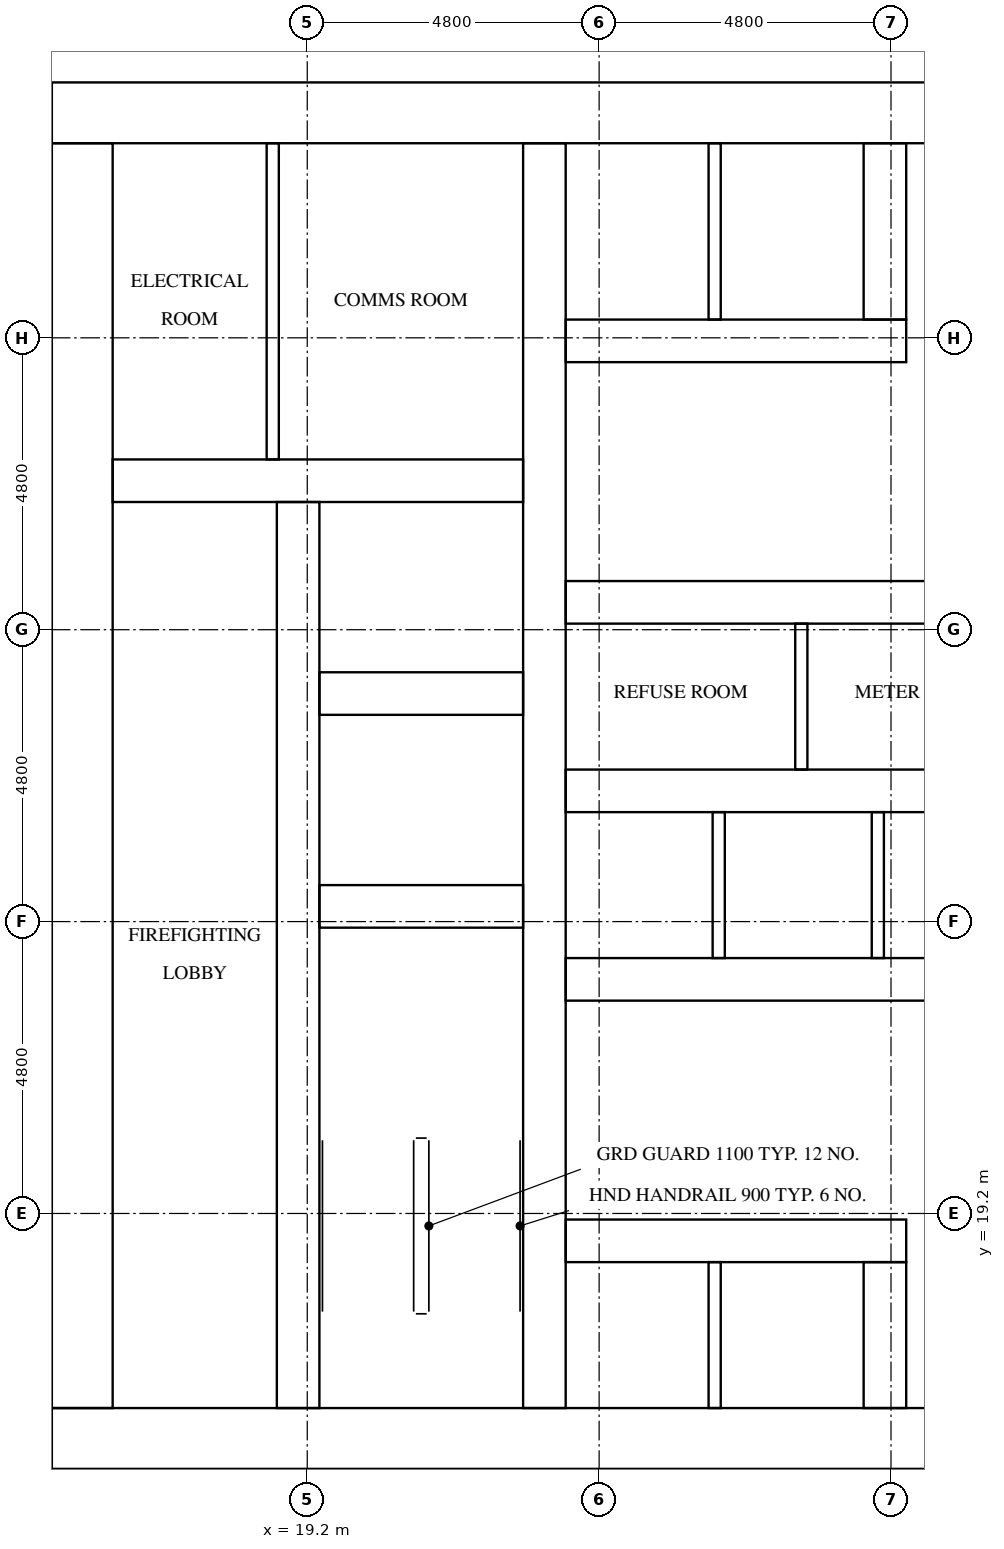
"""IFC4 building model, lengths in metres.
Left out: names, types, materials, properties, quantities, classifications, styles, units other than length and angle.
Written with IfcOpenShell. Run it as: python <this file> out.ifc"""

import sys

from ifc_helpers import new_model, si_unit, direction, frame, frame_2d, origin, place, context, subcontext, project, spatial, rectangle, extrude, element, fill, save


model = new_model("IFC4")
c1 = context("Model", 3, precision=1e-05, world=origin(), true_north=direction((0.0, 1.0)))
c2 = subcontext(c1, "Body", "Model", "MODEL_VIEW")
j1 = project(units=[si_unit("LENGTHUNIT", "METRE"), si_unit("PLANEANGLEUNIT", "RADIAN")], contexts=[c1])
p1 = place(None, origin())
s1 = spatial("IfcSite", under=j1, at=p1, CompositionType="ELEMENT")
p2 = place(p1, origin())
s2 = spatial("IfcBuilding", under=s1, at=p2, CompositionType="ELEMENT")
p3 = place(p2, frame((0.0, 0.0, 46.9)))
s3 = spatial("IfcBuildingStorey", under=s2, at=p3, CompositionType="ELEMENT", Elevation=46.9)
p4 = place(p3, frame((15.0, 15.5, 0.0), z_axis=(0.0, 0.0, 1.0), x_axis=(1.0, 0.0, 0.0)))
e1 = element("IfcWall", 1, at=p4, inside=s3, PredefinedType="SHEAR", context=c2, shape_type="SweptSolid", body=[
    extrude(rectangle(XDim=32.4, YDim=1.0, at=frame_2d((16.2, 0.0))), origin(), (0.0, 0.0, 1.0), 3.2),
])
p5 = place(p4, frame((15.3, 0.0, 0.0)))
e2 = element("IfcOpeningElement", 2, at=p5, cuts=e1, PredefinedType="OPENING", context=c2, shape_type="SweptSolid", body=[
    extrude(rectangle(XDim=1.8, YDim=2.1, at=frame_2d((0.9, 1.05))), frame((0.0, 0.51, 0.0), z_axis=(0.0, -1.0, 0.0), x_axis=(1.0, 0.0, 0.0)), (0.0, 0.0, 1.0), 1.02),
])
p6 = place(p3, frame((15.0, 37.3, 0.0), z_axis=(0.0, 0.0, 1.0), x_axis=(1.0, 0.0, 0.0)))
e3 = element("IfcWall", 3, at=p6, inside=s3, PredefinedType="SHEAR", context=c2, shape_type="SweptSolid", body=[
    extrude(rectangle(XDim=32.4, YDim=1.0, at=frame_2d((16.2, 0.0))), origin(), (0.0, 0.0, 1.0), 3.2),
])
p7 = place(p6, frame((15.3, 0.0, 0.0)))
e4 = element("IfcOpeningElement", 4, at=p7, cuts=e3, PredefinedType="OPENING", context=c2, shape_type="SweptSolid", body=[
    extrude(rectangle(XDim=1.8, YDim=2.1, at=frame_2d((0.9, 1.05))), frame((0.0, 0.51, 0.0), z_axis=(0.0, -1.0, 0.0), x_axis=(1.0, 0.0, 0.0)), (0.0, 0.0, 1.0), 1.02),
])
p8 = place(p6, frame((1.766, 0.0, 0.0)))
e5 = element("IfcOpeningElement", 5, at=p8, cuts=e3, PredefinedType="OPENING", context=c2, shape_type="SweptSolid", body=[
    extrude(rectangle(XDim=1.0, YDim=2.1, at=frame_2d((0.5, 1.05))), frame((0.0, 0.51, 0.0), z_axis=(0.0, -1.0, 0.0), x_axis=(1.0, 0.0, 0.0)), (0.0, 0.0, 1.0), 1.02),
])
p9 = place(p6, frame((5.241, 0.0, 0.0)))
e6 = element("IfcOpeningElement", 6, at=p9, cuts=e3, PredefinedType="OPENING", context=c2, shape_type="SweptSolid", body=[
    extrude(rectangle(XDim=1.0, YDim=2.1, at=frame_2d((0.5, 1.05))), frame((0.0, 0.51, 0.0), z_axis=(0.0, -1.0, 0.0), x_axis=(1.0, 0.0, 0.0)), (0.0, 0.0, 1.0), 1.02),
])
p10 = place(p3, frame((15.5, 16.0, 0.0), z_axis=(0.0, 0.0, 1.0), x_axis=(0.0, 1.0, 0.0)))
e7 = element("IfcWall", 7, at=p10, inside=s3, PredefinedType="SHEAR", context=c2, shape_type="SweptSolid", body=[
    extrude(rectangle(XDim=20.8, YDim=1.0, at=frame_2d((10.4, 0.0))), origin(), (0.0, 0.0, 1.0), 3.2),
])
p11 = place(p10, frame((4.76, 0.0, 0.0)))
e8 = element("IfcOpeningElement", 8, at=p11, cuts=e7, PredefinedType="OPENING", context=c2, shape_type="SweptSolid", body=[
    extrude(rectangle(XDim=1.2, YDim=2.1, at=frame_2d((0.6, 1.05))), frame((0.0, 0.51, 0.0), z_axis=(0.0, -1.0, 0.0), x_axis=(1.0, 0.0, 0.0)), (0.0, 0.0, 1.0), 1.02),
])
p12 = place(p3, frame((19.05, 16.0, 0.0), z_axis=(0.0, 0.0, 1.0), x_axis=(0.0, 1.0, 0.0)))
e9 = element("IfcWall", 9, at=p12, inside=s3, PredefinedType="SHEAR", context=c2, shape_type="SweptSolid", body=[
    extrude(rectangle(XDim=14.9, YDim=0.7, at=frame_2d((7.45, 0.0))), origin(), (0.0, 0.0, 1.0), 3.2),
])
p13 = place(p12, frame((9.45, 0.0, 0.0)))
e10 = element("IfcOpeningElement", 10, at=p13, cuts=e9, PredefinedType="OPENING", context=c2, shape_type="SweptSolid", body=[
    extrude(rectangle(XDim=1.1, YDim=2.1, at=frame_2d((0.55, 1.05))), frame((0.0, 0.36, 0.0), z_axis=(0.0, -1.0, 0.0), x_axis=(1.0, 0.0, 0.0)), (0.0, 0.0, 1.0), 0.72),
])
p14 = place(p12, frame((12.95, 0.0, 0.0)))
e11 = element("IfcOpeningElement", 11, at=p14, cuts=e9, PredefinedType="OPENING", context=c2, shape_type="SweptSolid", body=[
    extrude(rectangle(XDim=1.1, YDim=2.1, at=frame_2d((0.55, 1.05))), frame((0.0, 0.36, 0.0), z_axis=(0.0, -1.0, 0.0), x_axis=(1.0, 0.0, 0.0)), (0.0, 0.0, 1.0), 0.72),
])
p15 = place(p12, frame((0.2, 0.0, 0.0)))
e12 = element("IfcOpeningElement", 12, at=p15, cuts=e9, PredefinedType="OPENING", context=c2, shape_type="SweptSolid", body=[
    extrude(rectangle(XDim=1.2, YDim=2.1, at=frame_2d((0.6, 1.05))), frame((0.0, 0.36, 0.0), z_axis=(0.0, -1.0, 0.0), x_axis=(1.0, 0.0, 0.0)), (0.0, 0.0, 1.0), 0.72),
])
p16 = place(p3, frame((23.1, 16.0, 0.0), z_axis=(0.0, 0.0, 1.0), x_axis=(0.0, 1.0, 0.0)))
e13 = element("IfcWall", 13, at=p16, inside=s3, PredefinedType="SHEAR", context=c2, shape_type="SweptSolid", body=[
    extrude(rectangle(XDim=20.8, YDim=0.7, at=frame_2d((10.4, 0.0))), origin(), (0.0, 0.0, 1.0), 3.2),
])
for number, where, z_axis, x_axis in (
    (14, (19.4, 24.25, 0.0), (0.0, 0.0, 1.0), (1.0, 0.0, 0.0)),
    (15, (19.4, 27.75, 0.0), (0.0, 0.0, 1.0), (1.0, 0.0, 0.0)),
):
    element("IfcWall", number, at=place(p3, frame(where, z_axis=z_axis, x_axis=x_axis)), inside=s3, PredefinedType="SHEAR", context=c2, shape_type="SweptSolid", body=[
        extrude(rectangle(XDim=3.35, YDim=0.7, at=frame_2d((1.675, 0.0))), origin(), (0.0, 0.0, 1.0), 3.2),
    ])
p17 = place(p3, frame((16.0, 31.25, 0.0), z_axis=(0.0, 0.0, 1.0), x_axis=(1.0, 0.0, 0.0)))
e16 = element("IfcWall", 16, at=p17, inside=s3, PredefinedType="SHEAR", context=c2, shape_type="SweptSolid", body=[
    extrude(rectangle(XDim=6.75, YDim=0.7, at=frame_2d((3.375, 0.0))), origin(), (0.0, 0.0, 1.0), 3.2),
])
p18 = place(p3, frame((23.45, 18.75, 0.0), z_axis=(0.0, 0.0, 1.0), x_axis=(1.0, 0.0, 0.0)))
e17 = element("IfcWall", 17, at=p18, inside=s3, PredefinedType="SHEAR", context=c2, shape_type="SweptSolid", body=[
    extrude(rectangle(XDim=5.6, YDim=0.7, at=frame_2d((2.8, 0.0))), origin(), (0.0, 0.0, 1.0), 3.2),
])
p19 = place(p18, frame((0.625, 0.0, 0.0)))
e18 = element("IfcOpeningElement", 18, at=p19, cuts=e17, PredefinedType="OPENING", context=c2, shape_type="SweptSolid", body=[
    extrude(rectangle(XDim=1.1, YDim=2.1, at=frame_2d((0.55, 1.05))), frame((0.0, 0.36, 0.0), z_axis=(0.0, -1.0, 0.0), x_axis=(1.0, 0.0, 0.0)), (0.0, 0.0, 1.0), 0.72),
])
p20 = place(p18, frame((3.175, 0.0, 0.0)))
e19 = element("IfcOpeningElement", 19, at=p20, cuts=e17, PredefinedType="OPENING", context=c2, shape_type="SweptSolid", body=[
    extrude(rectangle(XDim=1.1, YDim=2.1, at=frame_2d((0.55, 1.05))), frame((0.0, 0.36, 0.0), z_axis=(0.0, -1.0, 0.0), x_axis=(1.0, 0.0, 0.0)), (0.0, 0.0, 1.0), 0.72),
])
p21 = place(p3, frame((23.45, 23.05, 0.0), z_axis=(0.0, 0.0, 1.0), x_axis=(1.0, 0.0, 0.0)))
e20 = element("IfcWall", 20, at=p21, inside=s3, PredefinedType="SHEAR", context=c2, shape_type="SweptSolid", body=[
    extrude(rectangle(XDim=15.5, YDim=0.7, at=frame_2d((7.75, 0.0))), origin(), (0.0, 0.0, 1.0), 3.2),
])
p22 = place(p21, frame((0.658, 0.0, 0.0)))
e21 = element("IfcOpeningElement", 21, at=p22, cuts=e20, PredefinedType="OPENING", context=c2, shape_type="SweptSolid", body=[
    extrude(rectangle(XDim=1.1, YDim=2.1, at=frame_2d((0.55, 1.05))), frame((0.0, 0.36, 0.0), z_axis=(0.0, -1.0, 0.0), x_axis=(1.0, 0.0, 0.0)), (0.0, 0.0, 1.0), 0.72),
])
p23 = place(p21, frame((3.275, 0.0, 0.0)))
e22 = element("IfcOpeningElement", 22, at=p23, cuts=e20, PredefinedType="OPENING", context=c2, shape_type="SweptSolid", body=[
    extrude(rectangle(XDim=1.1, YDim=2.1, at=frame_2d((0.55, 1.05))), frame((0.0, 0.36, 0.0), z_axis=(0.0, -1.0, 0.0), x_axis=(1.0, 0.0, 0.0)), (0.0, 0.0, 1.0), 0.72),
])
p24 = place(p21, frame((11.628, 0.0, 0.0)))
e23 = element("IfcOpeningElement", 23, at=p24, cuts=e20, PredefinedType="OPENING", context=c2, shape_type="SweptSolid", body=[
    extrude(rectangle(XDim=1.0, YDim=2.1, at=frame_2d((0.5, 1.05))), frame((0.0, 0.36, 0.0), z_axis=(0.0, -1.0, 0.0), x_axis=(1.0, 0.0, 0.0)), (0.0, 0.0, 1.0), 0.72),
])
p25 = place(p21, frame((14.245, 0.0, 0.0)))
e24 = element("IfcOpeningElement", 24, at=p25, cuts=e20, PredefinedType="OPENING", context=c2, shape_type="SweptSolid", body=[
    extrude(rectangle(XDim=1.0, YDim=2.1, at=frame_2d((0.5, 1.05))), frame((0.0, 0.36, 0.0), z_axis=(0.0, -1.0, 0.0), x_axis=(1.0, 0.0, 0.0)), (0.0, 0.0, 1.0), 0.72),
])
p26 = place(p3, frame((23.45, 26.15, 0.0), z_axis=(0.0, 0.0, 1.0), x_axis=(1.0, 0.0, 0.0)))
e25 = element("IfcWall", 25, at=p26, inside=s3, PredefinedType="SHEAR", context=c2, shape_type="SweptSolid", body=[
    extrude(rectangle(XDim=15.5, YDim=0.7, at=frame_2d((7.75, 0.0))), origin(), (0.0, 0.0, 1.0), 3.2),
])
p27 = place(p3, frame((23.45, 29.25, 0.0), z_axis=(0.0, 0.0, 1.0), x_axis=(1.0, 0.0, 0.0)))
e26 = element("IfcWall", 26, at=p27, inside=s3, PredefinedType="SHEAR", context=c2, shape_type="SweptSolid", body=[
    extrude(rectangle(XDim=15.5, YDim=0.7, at=frame_2d((7.75, 0.0))), origin(), (0.0, 0.0, 1.0), 3.2),
])
p28 = place(p27, frame((1.387, 0.0, 0.0)))
e27 = element("IfcOpeningElement", 27, at=p28, cuts=e26, PredefinedType="OPENING", context=c2, shape_type="SweptSolid", body=[
    extrude(rectangle(XDim=1.0, YDim=2.1, at=frame_2d((0.5, 1.05))), frame((0.0, 0.36, 0.0), z_axis=(0.0, -1.0, 0.0), x_axis=(1.0, 0.0, 0.0)), (0.0, 0.0, 1.0), 0.72),
])
p29 = place(p27, frame((5.312, 0.0, 0.0)))
e28 = element("IfcOpeningElement", 28, at=p29, cuts=e26, PredefinedType="OPENING", context=c2, shape_type="SweptSolid", body=[
    extrude(rectangle(XDim=1.0, YDim=2.1, at=frame_2d((0.5, 1.05))), frame((0.0, 0.36, 0.0), z_axis=(0.0, -1.0, 0.0), x_axis=(1.0, 0.0, 0.0)), (0.0, 0.0, 1.0), 0.72),
])
p30 = place(p27, frame((9.188, 0.0, 0.0)))
e29 = element("IfcOpeningElement", 29, at=p30, cuts=e26, PredefinedType="OPENING", context=c2, shape_type="SweptSolid", body=[
    extrude(rectangle(XDim=1.0, YDim=2.1, at=frame_2d((0.5, 1.05))), frame((0.0, 0.36, 0.0), z_axis=(0.0, -1.0, 0.0), x_axis=(1.0, 0.0, 0.0)), (0.0, 0.0, 1.0), 0.72),
])
p31 = place(p27, frame((13.113, 0.0, 0.0)))
e30 = element("IfcOpeningElement", 30, at=p31, cuts=e26, PredefinedType="OPENING", context=c2, shape_type="SweptSolid", body=[
    extrude(rectangle(XDim=1.0, YDim=2.1, at=frame_2d((0.5, 1.05))), frame((0.0, 0.36, 0.0), z_axis=(0.0, -1.0, 0.0), x_axis=(1.0, 0.0, 0.0)), (0.0, 0.0, 1.0), 0.72),
])
p32 = place(p3, frame((23.45, 33.55, 0.0), z_axis=(0.0, 0.0, 1.0), x_axis=(1.0, 0.0, 0.0)))
e31 = element("IfcWall", 31, at=p32, inside=s3, PredefinedType="SHEAR", context=c2, shape_type="SweptSolid", body=[
    extrude(rectangle(XDim=5.6, YDim=0.7, at=frame_2d((2.8, 0.0))), origin(), (0.0, 0.0, 1.0), 3.2),
])
p33 = place(p3, frame((28.7, 16.0, 0.0), z_axis=(0.0, 0.0, 1.0), x_axis=(0.0, 1.0, 0.0)))
e32 = element("IfcWall", 32, at=p33, inside=s3, PredefinedType="SHEAR", context=c2, shape_type="SweptSolid", body=[
    extrude(rectangle(XDim=2.4, YDim=0.7, at=frame_2d((1.2, 0.0))), origin(), (0.0, 0.0, 1.0), 3.2),
])
p34 = place(p3, frame((28.7, 33.9, 0.0), z_axis=(0.0, 0.0, 1.0), x_axis=(0.0, 1.0, 0.0)))
e33 = element("IfcWall", 33, at=p34, inside=s3, PredefinedType="SHEAR", context=c2, shape_type="SweptSolid", body=[
    extrude(rectangle(XDim=2.9, YDim=0.7, at=frame_2d((1.45, 0.0))), origin(), (0.0, 0.0, 1.0), 3.2),
])
for number, where, z_axis, x_axis in (
    (34, (25.967, 23.4, 0.0), (0.0, 0.0, 1.0), (0.0, 1.0, 0.0)),
    (35, (28.583, 23.4, 0.0), (0.0, 0.0, 1.0), (0.0, 1.0, 0.0)),
):
    element("IfcWall", number, at=place(p3, frame(where, z_axis=z_axis, x_axis=x_axis)), inside=s3, PredefinedType="SOLIDWALL", context=c2, shape_type="SweptSolid", body=[
        extrude(rectangle(XDim=2.4, YDim=0.2, at=frame_2d((1.2, 0.0))), origin(), (0.0, 0.0, 1.0), 3.2),
    ])
p35 = place(p3, frame((25.9, 16.0, 0.0), z_axis=(0.0, 0.0, 1.0), x_axis=(0.0, 1.0, 0.0)))
e36 = element("IfcWall", 36, at=p35, inside=s3, PredefinedType="SOLIDWALL", context=c2, shape_type="SweptSolid", body=[
    extrude(rectangle(XDim=2.4, YDim=0.2, at=frame_2d((1.2, 0.0))), origin(), (0.0, 0.0, 1.0), 3.2),
])
p36 = place(p3, frame((25.9, 33.9, 0.0), z_axis=(0.0, 0.0, 1.0), x_axis=(0.0, 1.0, 0.0)))
e37 = element("IfcWall", 37, at=p36, inside=s3, PredefinedType="SOLIDWALL", context=c2, shape_type="SweptSolid", body=[
    extrude(rectangle(XDim=2.9, YDim=0.2, at=frame_2d((1.45, 0.0))), origin(), (0.0, 0.0, 1.0), 3.2),
])
p37 = place(p3, frame((18.633, 31.6, 0.0), z_axis=(0.0, 0.0, 1.0), x_axis=(0.0, 1.0, 0.0)))
e38 = element("IfcWall", 38, at=p37, inside=s3, PredefinedType="PARTITIONING", context=c2, shape_type="SweptSolid", body=[
    extrude(rectangle(XDim=5.2, YDim=0.2, at=frame_2d((2.6, 0.0))), origin(), (0.0, 0.0, 1.0), 3.2),
])
p38 = place(p3, frame((27.325, 26.5, 0.0), z_axis=(0.0, 0.0, 1.0), x_axis=(0.0, 1.0, 0.0)))
e39 = element("IfcWall", 39, at=p38, inside=s3, PredefinedType="PARTITIONING", context=c2, shape_type="SweptSolid", body=[
    extrude(rectangle(XDim=2.4, YDim=0.2, at=frame_2d((1.2, 0.0))), origin(), (0.0, 0.0, 1.0), 3.2),
])
p39 = place(p19, origin())
e40 = element("IfcDoor", 40, at=p39, inside=s3, OperationType="DOUBLE_DOOR_SLIDING", PredefinedType="DOOR", context=c2, shape_type="SweptSolid", body=[
    extrude(rectangle(XDim=1.1, YDim=2.1, at=frame_2d((0.55, 1.05))), frame((0.0, 0.025, 0.0), z_axis=(0.0, -1.0, 0.0), x_axis=(1.0, 0.0, 0.0)), (0.0, 0.0, 1.0), 0.05),
])
fill(e18, e40)
p40 = place(p20, origin())
e41 = element("IfcDoor", 41, at=p40, inside=s3, OperationType="DOUBLE_DOOR_SLIDING", PredefinedType="DOOR", context=c2, shape_type="SweptSolid", body=[
    extrude(rectangle(XDim=1.1, YDim=2.1, at=frame_2d((0.55, 1.05))), frame((0.0, 0.025, 0.0), z_axis=(0.0, -1.0, 0.0), x_axis=(1.0, 0.0, 0.0)), (0.0, 0.0, 1.0), 0.05),
])
fill(e19, e41)
p41 = place(p22, origin())
e42 = element("IfcDoor", 42, at=p41, inside=s3, OperationType="DOUBLE_DOOR_SLIDING", PredefinedType="DOOR", context=c2, shape_type="SweptSolid", body=[
    extrude(rectangle(XDim=1.1, YDim=2.1, at=frame_2d((0.55, 1.05))), frame((0.0, 0.025, 0.0), z_axis=(0.0, -1.0, 0.0), x_axis=(1.0, 0.0, 0.0)), (0.0, 0.0, 1.0), 0.05),
])
fill(e21, e42)
p42 = place(p23, origin())
e43 = element("IfcDoor", 43, at=p42, inside=s3, OperationType="DOUBLE_DOOR_SLIDING", PredefinedType="DOOR", context=c2, shape_type="SweptSolid", body=[
    extrude(rectangle(XDim=1.1, YDim=2.1, at=frame_2d((0.55, 1.05))), frame((0.0, 0.025, 0.0), z_axis=(0.0, -1.0, 0.0), x_axis=(1.0, 0.0, 0.0)), (0.0, 0.0, 1.0), 0.05),
])
fill(e22, e43)
p43 = place(p13, origin())
e44 = element("IfcDoor", 44, at=p43, inside=s3, OperationType="DOUBLE_DOOR_SLIDING", PredefinedType="DOOR", context=c2, shape_type="SweptSolid", body=[
    extrude(rectangle(XDim=1.1, YDim=2.1, at=frame_2d((0.55, 1.05))), frame((0.0, 0.025, 0.0), z_axis=(0.0, -1.0, 0.0), x_axis=(1.0, 0.0, 0.0)), (0.0, 0.0, 1.0), 0.05),
])
fill(e10, e44)
p44 = place(p14, origin())
e45 = element("IfcDoor", 45, at=p44, inside=s3, OperationType="DOUBLE_DOOR_SLIDING", PredefinedType="DOOR", context=c2, shape_type="SweptSolid", body=[
    extrude(rectangle(XDim=1.1, YDim=2.1, at=frame_2d((0.55, 1.05))), frame((0.0, 0.025, 0.0), z_axis=(0.0, -1.0, 0.0), x_axis=(1.0, 0.0, 0.0)), (0.0, 0.0, 1.0), 0.05),
])
fill(e11, e45)
p45 = place(p15, frame((1.2, 0.0, 0.0), z_axis=(0.0, 0.0, 1.0), x_axis=(-1.0, 0.0, 0.0)))
e46 = element("IfcDoor", 46, at=p45, inside=s3, OperationType="SINGLE_SWING_LEFT", PredefinedType="DOOR", context=c2, shape_type="SweptSolid", body=[
    extrude(rectangle(XDim=1.2, YDim=2.1, at=frame_2d((0.6, 1.05))), frame((0.0, 0.025, 0.0), z_axis=(0.0, -1.0, 0.0), x_axis=(1.0, 0.0, 0.0)), (0.0, 0.0, 1.0), 0.05),
])
fill(e12, e46)
p46 = place(p11, frame((1.2, 0.0, 0.0), z_axis=(0.0, 0.0, 1.0), x_axis=(-1.0, 0.0, 0.0)))
e47 = element("IfcDoor", 47, at=p46, inside=s3, OperationType="SINGLE_SWING_RIGHT", PredefinedType="DOOR", context=c2, shape_type="SweptSolid", body=[
    extrude(rectangle(XDim=1.2, YDim=2.1, at=frame_2d((0.6, 1.05))), frame((0.0, 0.025, 0.0), z_axis=(0.0, -1.0, 0.0), x_axis=(1.0, 0.0, 0.0)), (0.0, 0.0, 1.0), 0.05),
])
fill(e8, e47)
p47 = place(p8, origin())
e48 = element("IfcDoor", 48, at=p47, inside=s3, OperationType="SINGLE_SWING_RIGHT", PredefinedType="DOOR", context=c2, shape_type="SweptSolid", body=[
    extrude(rectangle(XDim=1.0, YDim=2.1, at=frame_2d((0.5, 1.05))), frame((0.0, 0.025, 0.0), z_axis=(0.0, -1.0, 0.0), x_axis=(1.0, 0.0, 0.0)), (0.0, 0.0, 1.0), 0.05),
])
fill(e5, e48)
p48 = place(p9, origin())
e49 = element("IfcDoor", 49, at=p48, inside=s3, OperationType="SINGLE_SWING_LEFT", PredefinedType="DOOR", context=c2, shape_type="SweptSolid", body=[
    extrude(rectangle(XDim=1.0, YDim=2.1, at=frame_2d((0.5, 1.05))), frame((0.0, 0.025, 0.0), z_axis=(0.0, -1.0, 0.0), x_axis=(1.0, 0.0, 0.0)), (0.0, 0.0, 1.0), 0.05),
])
fill(e6, e49)
p49 = place(p28, origin())
e50 = element("IfcDoor", 50, at=p49, inside=s3, OperationType="SINGLE_SWING_RIGHT", PredefinedType="DOOR", context=c2, shape_type="SweptSolid", body=[
    extrude(rectangle(XDim=1.0, YDim=2.1, at=frame_2d((0.5, 1.05))), frame((0.0, 0.025, 0.0), z_axis=(0.0, -1.0, 0.0), x_axis=(1.0, 0.0, 0.0)), (0.0, 0.0, 1.0), 0.05),
])
fill(e27, e50)
p50 = place(p29, origin())
e51 = element("IfcDoor", 51, at=p50, inside=s3, OperationType="SINGLE_SWING_LEFT", PredefinedType="DOOR", context=c2, shape_type="SweptSolid", body=[
    extrude(rectangle(XDim=1.0, YDim=2.1, at=frame_2d((0.5, 1.05))), frame((0.0, 0.025, 0.0), z_axis=(0.0, -1.0, 0.0), x_axis=(1.0, 0.0, 0.0)), (0.0, 0.0, 1.0), 0.05),
])
fill(e28, e51)
save(model, sys.argv[1])
